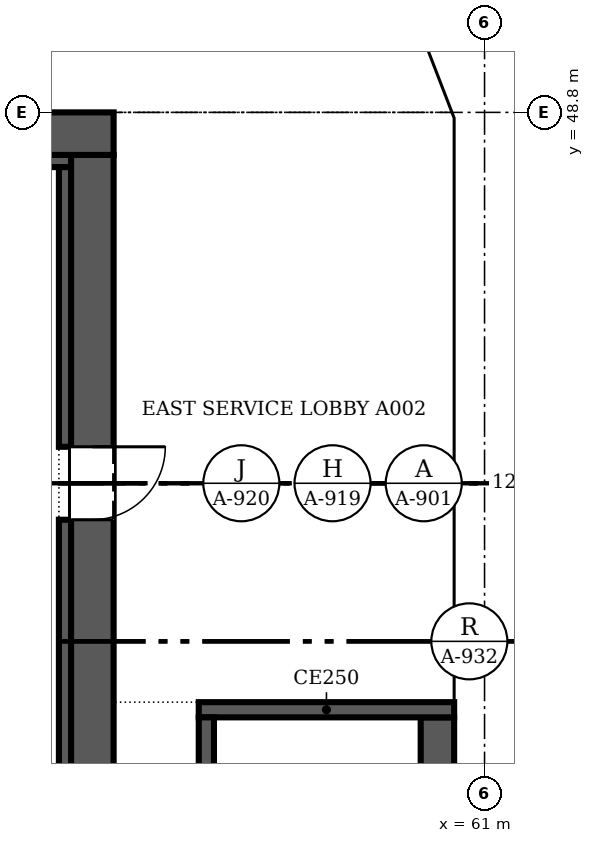
"""IFC4 building model, lengths in metres.
Left out: names, types, materials, properties, quantities, classifications, styles, units other than length and angle.
Written with IfcOpenShell. Run it as: python <this file> out.ifc"""

import sys

from ifc_helpers import new_model, si_unit, direction, frame, frame_2d, origin, place, context, subcontext, project, spatial, polyline, rectangle, outline, extrude, faceted_brep, source, transform, mapped, element, fill, save


model = new_model("IFC4")
c1 = context("Model", 3, precision=1e-05, world=origin(), true_north=direction((0.0, 1.0)))
c2 = subcontext(c1, "Body", "Model", "MODEL_VIEW")
j1 = project(units=[si_unit("LENGTHUNIT", "METRE"), si_unit("PLANEANGLEUNIT", "RADIAN")], contexts=[c1])
p1 = place(None, origin())
s1 = spatial("IfcSite", under=j1, at=p1, CompositionType="ELEMENT")
p2 = place(p1, origin())
s2 = spatial("IfcBuilding", under=s1, at=p2, CompositionType="ELEMENT")
p3 = place(p2, frame((0.0, 0.0, 143.0)))
s3 = spatial("IfcBuildingStorey", under=s2, at=p3, CompositionType="ELEMENT", Elevation=143.0)
m1 = source(origin(), c2, "Body", "Brep", [
    faceted_brep([(3.05, -0.25, 0.0), (6.1, -0.25, 3.8), (6.1, -0.25, 3.8), (3.05, -0.25, 7.6), (0.0, -0.25, 3.8), (0.0, 0.25, 3.8), (3.05, 0.25, 7.6), (6.1, 0.25, 3.8), (6.1, 0.25, 3.8), (3.05, 0.25, 0.0)], [[[0, 1, 2, 3, 4]], [[5, 6, 7, 8, 9]], [[9, 8, 1, 0]], [[7, 6, 3, 2]], [[6, 5, 4, 3]], [[5, 9, 0, 4]], [[1, 8, 7, 2]]]),
])
p4 = place(p3, frame((60.75, 36.6, -3.8), z_axis=(0.0, 0.0, 1.0), x_axis=(0.0, 1.0, 0.0)))
e1 = element("IfcWall", 1, at=p4, inside=s3, PredefinedType="SOLIDWALL", context=c2, shape_type="MappedRepresentation", body=[
    mapped(m1, transform((0.0, 0.0, 0.0), scale=1.0)),
])
m2 = source(origin(), c2, "Body", "SweptSolid", [
    extrude(outline(polyline([(3.05, 0.399), (5.78, 3.8), (3.05, 7.201), (0.321, 3.8), (3.05, 0.399)])), frame((0.0, 0.26, 0.0), z_axis=(0.0, -1.0, 0.0), x_axis=(1.0, 0.0, 0.0)), (0.0, 0.0, 1.0), 0.52),
])
p5 = place(p4, origin())
e2 = element("IfcOpeningElement", 2, at=p5, cuts=e1, PredefinedType="OPENING", context=c2, shape_type="MappedRepresentation", body=[
    mapped(m2, transform((0.0, 0.0, 0.0), scale=1.0)),
])
m3 = source(origin(), c2, "Body", "Brep", [
    faceted_brep([(3.05, -0.25, 0.0), (6.053, -0.25, 3.8), (3.05, -0.25, 7.6), (0.0, -0.25, 3.8), (0.0, 0.25, 3.8), (3.05, 0.25, 7.6), (6.007, 0.25, 3.859), (6.007, 0.25, 3.741), (3.05, 0.25, 0.0), (6.053, 0.0, 3.8)], [[[0, 1, 2, 3]], [[4, 5, 6, 7, 8]], [[8, 7, 9, 1, 0]], [[6, 5, 2, 1, 9]], [[5, 4, 3, 2]], [[4, 8, 0, 3]], [[9, 7, 6]]]),
])
p6 = place(p3, frame((60.75, 42.7, -3.8), z_axis=(0.0, 0.0, 1.0), x_axis=(0.0, 1.0, 0.0)))
e3 = element("IfcWall", 3, at=p6, inside=s3, PredefinedType="SOLIDWALL", context=c2, shape_type="MappedRepresentation", body=[
    mapped(m3, transform((0.0, 0.0, 0.0), scale=1.0)),
])
m4 = source(origin(), c2, "Body", "SweptSolid", [
    extrude(outline(polyline([(3.049, 0.401), (5.735, 3.8), (3.049, 7.199), (0.321, 3.8), (3.049, 0.401)])), frame((0.0, 0.26, 0.0), z_axis=(0.0, -1.0, 0.0), x_axis=(1.0, 0.0, 0.0)), (0.0, 0.0, 1.0), 0.52),
])
p7 = place(p6, origin())
e4 = element("IfcOpeningElement", 4, at=p7, cuts=e3, PredefinedType="OPENING", context=c2, shape_type="MappedRepresentation", body=[
    mapped(m4, transform((0.0, 0.0, 0.0), scale=1.0)),
])
m5 = source(origin(), c2, "Body", "Brep", [
    faceted_brep([(2.95, -0.25, 0.0), (3.003, -0.25, 0.068), (3.003, -0.25, 7.532), (2.95, -0.25, 7.6), (0.0, -0.25, 3.8), (0.047, 0.25, 3.86), (2.898, 0.25, 7.532), (2.898, 0.25, 0.068), (0.047, 0.25, 3.74), (2.95, 0.0, 0.0), (2.95, 0.0, 7.6), (0.0, 0.0, 3.8)], [[[0, 1, 2, 3, 4]], [[5, 6, 7, 8]], [[1, 0, 9]], [[10, 3, 2]], [[6, 5, 11, 4, 3, 10]], [[8, 7, 9, 0, 4, 11]], [[8, 11, 5]], [[1, 9, 7, 6, 10, 2]]]),
])
p8 = place(p3, frame((60.75, 48.753, -3.8), z_axis=(0.0, 0.0, 1.0), x_axis=(-0.35992665181, 0.932980602862, 0.0)))
e5 = element("IfcWall", 5, at=p8, inside=s3, PredefinedType="SOLIDWALL", context=c2, shape_type="MappedRepresentation", body=[
    mapped(m5, transform((0.0, 0.0, 0.0), scale=1.0)),
])
m6 = source(origin(), c2, "Body", "SweptSolid", [
    extrude(outline(polyline([(2.75, 6.935), (0.316, 3.8), (2.75, 0.665), (2.75, 6.935)])), frame((0.0, 0.26, 0.0), z_axis=(0.0, -1.0, 0.0), x_axis=(1.0, 0.0, 0.0)), (0.0, 0.0, 1.0), 0.52),
])
p9 = place(p8, origin())
e6 = element("IfcOpeningElement", 6, at=p9, cuts=e5, PredefinedType="OPENING", context=c2, shape_type="MappedRepresentation", body=[
    mapped(m6, transform((0.0, 0.0, 0.0), scale=1.0)),
])
p10 = place(p2, frame((0.0, 0.0, 146.8)))
s4 = spatial("IfcBuildingStorey", under=s2, at=p10, CompositionType="ELEMENT", Elevation=146.8)
p11 = place(p10, frame((60.75, 33.55, -3.8), z_axis=(0.0, 0.0, 1.0), x_axis=(0.0, 1.0, 0.0)))
e7 = element("IfcWall", 7, at=p11, inside=s4, PredefinedType="SOLIDWALL", context=c2, shape_type="MappedRepresentation", body=[
    mapped(m1, transform((0.0, 0.0, 0.0), scale=1.0)),
])
p12 = place(p11, origin())
e8 = element("IfcOpeningElement", 8, at=p12, cuts=e7, PredefinedType="OPENING", context=c2, shape_type="MappedRepresentation", body=[
    mapped(m2, transform((0.0, 0.0, 0.0), scale=1.0)),
])
m7 = source(origin(), c2, "Body", "SweptSolid", [
    extrude(outline(polyline([(3.05, 0.0), (6.1, 3.8), (3.05, 7.6), (0.0, 3.8), (3.05, 0.0)])), frame((0.0, 0.25, 0.0), z_axis=(0.0, -1.0, 0.0), x_axis=(1.0, 0.0, 0.0)), (0.0, 0.0, 1.0), 0.5),
])
p13 = place(p10, frame((60.75, 39.65, -3.8), z_axis=(0.0, 0.0, 1.0), x_axis=(0.0, 1.0, 0.0)))
e9 = element("IfcWall", 9, at=p13, inside=s4, PredefinedType="SOLIDWALL", context=c2, shape_type="MappedRepresentation", body=[
    mapped(m7, transform((0.0, 0.0, 0.0), scale=1.0)),
])
p14 = place(p13, origin())
e10 = element("IfcOpeningElement", 10, at=p14, cuts=e9, PredefinedType="OPENING", context=c2, shape_type="MappedRepresentation", body=[
    mapped(m2, transform((0.0, 0.0, 0.0), scale=1.0)),
])
m8 = source(origin(), c2, "Body", "Brep", [
    faceted_brep([(3.003, -0.25, 0.0), (3.05, -0.25, 0.06), (3.05, -0.25, 7.54), (3.003, -0.25, 7.6), (0.0, -0.25, 3.8), (0.0, 0.25, 3.8), (2.957, 0.25, 7.541), (2.957, 0.25, 0.059), (3.003, 0.0, 0.0), (3.003, 0.0, 7.6)], [[[0, 1, 2, 3, 4]], [[5, 6, 7]], [[1, 0, 8]], [[9, 3, 2]], [[6, 5, 4, 3, 9]], [[5, 7, 8, 0, 4]], [[1, 8, 7, 6, 9, 2]]]),
])
p15 = place(p10, frame((60.75, 45.75, -3.8), z_axis=(0.0, 0.0, 1.0), x_axis=(0.0, 1.0, 0.0)))
e11 = element("IfcWall", 11, at=p15, inside=s4, PredefinedType="SOLIDWALL", context=c2, shape_type="MappedRepresentation", body=[
    mapped(m8, transform((0.0, 0.0, 0.0), scale=1.0)),
])
m9 = source(origin(), c2, "Body", "SweptSolid", [
    extrude(outline(polyline([(2.803, 6.944), (0.319, 3.8), (2.803, 0.656), (2.803, 6.944)])), frame((0.0, 0.26, 0.0), z_axis=(0.0, -1.0, 0.0), x_axis=(1.0, 0.0, 0.0)), (0.0, 0.0, 1.0), 0.52),
])
p16 = place(p15, origin())
e12 = element("IfcOpeningElement", 12, at=p16, cuts=e11, PredefinedType="OPENING", context=c2, shape_type="MappedRepresentation", body=[
    mapped(m9, transform((0.0, 0.0, 0.0), scale=1.0)),
])
m10 = source(origin(), c2, "Body", "Brep", [
    faceted_brep([(0.047, -0.25, 0.0), (2.997, -0.25, 3.8), (0.047, -0.25, 7.6), (0.0, -0.25, 7.541), (0.0, -0.25, 0.059), (0.093, 0.25, 7.54), (2.944, 0.25, 3.868), (2.944, 0.25, 3.732), (0.093, 0.25, 0.06), (2.997, 0.0, 3.8), (0.047, 0.0, 0.0), (0.047, 0.0, 7.6)], [[[0, 1, 2, 3, 4]], [[5, 6, 7, 8]], [[8, 7, 9, 1, 0, 10]], [[6, 5, 11, 2, 1, 9]], [[3, 2, 11]], [[10, 0, 4]], [[8, 10, 4, 3, 11, 5]], [[9, 7, 6]]]),
])
p17 = place(p10, frame((60.767, 48.71, -3.8), z_axis=(0.0, 0.0, 1.0), x_axis=(-0.359901446078, 0.932990326376, 0.0)))
e13 = element("IfcWall", 13, at=p17, inside=s4, PredefinedType="SOLIDWALL", context=c2, shape_type="MappedRepresentation", body=[
    mapped(m10, transform((0.0, 0.0, 0.0), scale=1.0)),
])
m11 = source(origin(), c2, "Body", "SweptSolid", [
    extrude(outline(polyline([(0.247, 0.665), (2.681, 3.8), (0.247, 6.935), (0.247, 0.665)])), frame((0.0, 0.26, 0.0), z_axis=(0.0, -1.0, 0.0), x_axis=(1.0, 0.0, 0.0)), (0.0, 0.0, 1.0), 0.52),
])
p18 = place(p17, origin())
e14 = element("IfcOpeningElement", 14, at=p18, cuts=e13, PredefinedType="OPENING", context=c2, shape_type="MappedRepresentation", body=[
    mapped(m11, transform((0.0, 0.0, 0.0), scale=1.0)),
])
p19 = place(p3, frame((30.5, 48.45, 0.0), z_axis=(0.0, 0.0, 1.0), x_axis=(1.0, 0.0, 0.0)))
e15 = element("IfcWall", 15, at=p19, inside=s3, PredefinedType="SHEAR", context=c2, shape_type="SweptSolid", body=[
    extrude(rectangle(XDim=24.4, YDim=0.7, at=frame_2d((12.2, 0.0))), origin(), (0.0, 0.0, 1.0), 3.8),
])
p20 = place(p3, frame((54.55, 48.1, 0.0), z_axis=(0.0, 0.0, 1.0), x_axis=(0.0, -1.0, 0.0)))
e16 = element("IfcWall", 16, at=p20, inside=s3, PredefinedType="SHEAR", context=c2, shape_type="SweptSolid", body=[
    extrude(rectangle(XDim=23.0, YDim=0.7, at=frame_2d((11.5, 0.0))), origin(), (0.0, 0.0, 1.0), 3.8),
])
m12 = source(origin(), c2, "Body", "SweptSolid", [
    extrude(rectangle(XDim=1.2, YDim=2.1, at=frame_2d((0.6, 1.05))), frame((0.0, 0.36, 0.0), z_axis=(0.0, -1.0, 0.0), x_axis=(1.0, 0.0, 0.0)), (0.0, 0.0, 1.0), 0.72),
])
p21 = place(p20, frame((4.8, 0.0, 0.0)))
e17 = element("IfcOpeningElement", 17, at=p21, cuts=e16, PredefinedType="OPENING", context=c2, shape_type="MappedRepresentation", body=[
    mapped(m12, transform((0.0, 0.0, 0.0), scale=1.0)),
])
p22 = place(p3, frame((31.2, 48.0, 0.0), z_axis=(0.0, 0.0, 1.0), x_axis=(1.0, 0.0, 0.0)))
e18 = element("IfcWall", 18, at=p22, inside=s3, PredefinedType="SOLIDWALL", context=c2, shape_type="SweptSolid", body=[
    extrude(rectangle(XDim=23.0, YDim=0.2, at=frame_2d((11.5, 0.0))), origin(), (0.0, 0.0, 1.0), 3.8),
])
p23 = place(p3, frame((54.1, 36.88, 0.0), z_axis=(0.0, 0.0, 1.0), x_axis=(0.0, 1.0, 0.0)))
e19 = element("IfcWall", 19, at=p23, inside=s3, PredefinedType="SOLIDWALL", context=c2, shape_type="SweptSolid", body=[
    extrude(rectangle(XDim=5.22, YDim=0.2, at=frame_2d((2.61, 0.0))), origin(), (0.0, 0.0, 1.0), 3.8),
])
p24 = place(p3, frame((54.1, 43.3, 0.0), z_axis=(0.0, 0.0, 1.0), x_axis=(0.0, 1.0, 0.0)))
e20 = element("IfcWall", 20, at=p24, inside=s3, PredefinedType="SOLIDWALL", context=c2, shape_type="SweptSolid", body=[
    extrude(rectangle(XDim=4.6, YDim=0.2, at=frame_2d((2.3, 0.0))), origin(), (0.0, 0.0, 1.0), 3.8),
])
p25 = place(p3, frame((56.425, 30.85, 0.0), z_axis=(0.0, 0.0, 1.0), x_axis=(0.0, 1.0, 0.0)))
e21 = element("IfcWall", 21, at=p25, inside=s3, PredefinedType="SOLIDWALL", context=c2, shape_type="SweptSolid", body=[
    extrude(rectangle(XDim=8.0, YDim=0.25, at=frame_2d((4.0, 0.0))), origin(), (0.0, 0.0, 1.0), 3.8),
])
p26 = place(p3, frame((56.3, 38.975, 0.0), z_axis=(0.0, 0.0, 1.0), x_axis=(1.0, 0.0, 0.0)))
e22 = element("IfcWall", 22, at=p26, inside=s3, PredefinedType="SOLIDWALL", context=c2, shape_type="SweptSolid", body=[
    extrude(rectangle(XDim=4.2, YDim=0.25, at=frame_2d((2.1, 0.0))), origin(), (0.0, 0.0, 1.0), 3.8),
])
p27 = place(p3, frame((60.225, 38.85, 0.0), z_axis=(0.0, 0.0, 1.0), x_axis=(0.0, -1.0, 0.0)))
e23 = element("IfcWall", 23, at=p27, inside=s3, PredefinedType="SOLIDWALL", context=c2, shape_type="SweptSolid", body=[
    extrude(rectangle(XDim=8.0, YDim=0.55, at=frame_2d((4.0, 0.0))), origin(), (0.0, 0.0, 1.0), 3.8),
])
m13 = source(origin(), c2, "Body", "SweptSolid", [
    extrude(rectangle(XDim=1.2, YDim=2.1, at=frame_2d((0.6, 1.05))), frame((0.0, 0.025, 0.0), z_axis=(0.0, -1.0, 0.0), x_axis=(1.0, 0.0, 0.0)), (0.0, 0.0, 1.0), 0.05),
])
p28 = place(p21, origin())
e24 = element("IfcDoor", 24, at=p28, inside=s3, OperationType="SINGLE_SWING_LEFT", PredefinedType="DOOR", context=c2, shape_type="MappedRepresentation", body=[
    mapped(m13, transform((0.0, 0.0, 0.0), scale=1.0)),
])
fill(e17, e24)
save(model, sys.argv[1])
